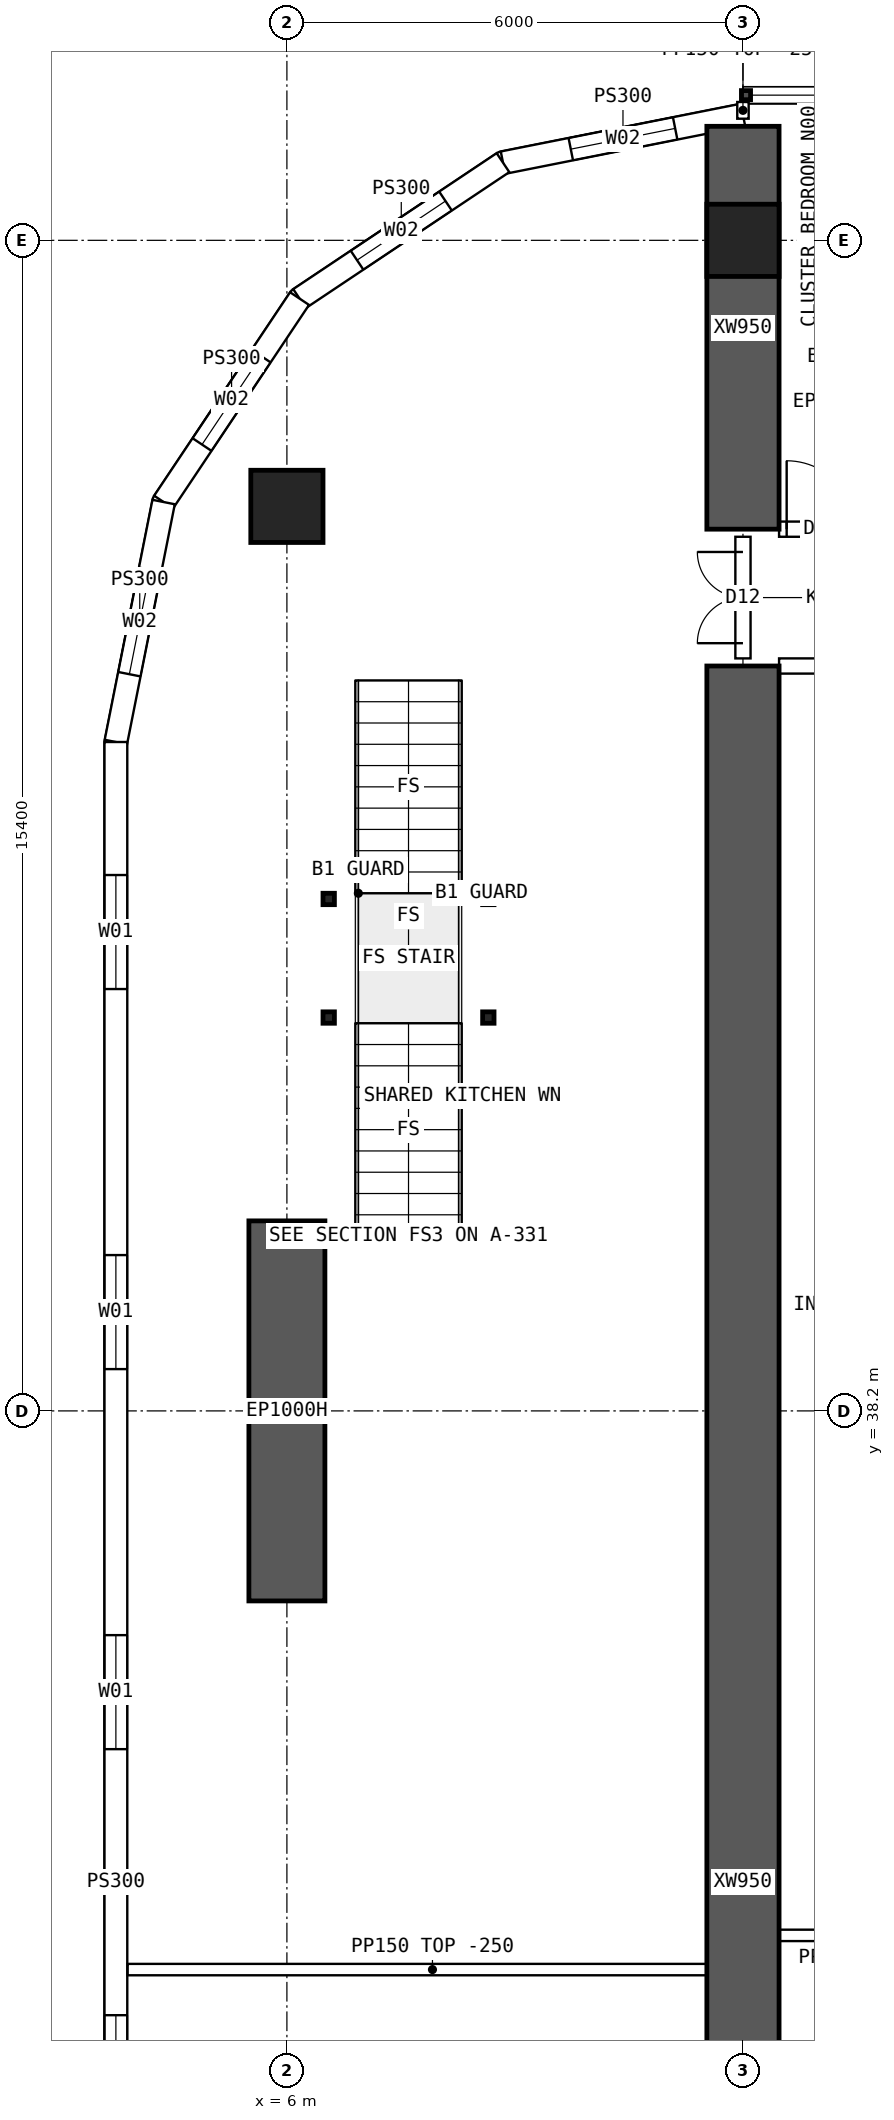
"""IFC4 building model, lengths in metres.
Left out: names, types, materials, properties, quantities, classifications, styles, units other than length and angle.
Written with IfcOpenShell. Run it as: python <this file> out.ifc"""

import sys

from ifc_helpers import new_model, si_unit, direction, frame, frame_2d, origin, origin_2d, place, context, subcontext, project, spatial, polyline, rectangle, hollow_rectangle, outline, extrude, element, fill, save


model = new_model("IFC4")
c1 = context("Model", 3, precision=1e-05, world=origin(), true_north=direction((0.0, 1.0)))
c2 = subcontext(c1, "Body", "Model", "MODEL_VIEW")
j1 = project(units=[si_unit("LENGTHUNIT", "METRE"), si_unit("PLANEANGLEUNIT", "RADIAN")], contexts=[c1])
p1 = place(None, origin())
s1 = spatial("IfcSite", under=j1, at=p1, CompositionType="ELEMENT")
p2 = place(p1, origin())
s2 = spatial("IfcBuilding", under=s1, at=p2, CompositionType="ELEMENT")
p3 = place(p2, frame((0.0, 0.0, 114.4)))
s3 = spatial("IfcBuildingStorey", under=s2, at=p3, CompositionType="ELEMENT", Elevation=114.4)
for number, where, z_axis, x_axis in (
    (1, (12.0, 53.6, 0.0), (0.0, 0.0, 1.0), (1.0, 0.0, 0.0)),
    (2, (6.0, 50.1, 0.0), (0.0, 0.0, 1.0), (1.0, 0.0, 0.0)),
):
    element("IfcColumn", number, at=place(p3, frame(where, z_axis=z_axis, x_axis=x_axis)), inside=s3, PredefinedType="COLUMN", context=c2, shape_type="SweptSolid", body=[
        extrude(hollow_rectangle(XDim=0.95, YDim=0.95, WallThickness=0.095, at=origin_2d()), origin(), (0.0, 0.0, 1.0), 3.75),
    ])
p4 = place(p3, frame((6.0, 35.7, 0.0), z_axis=(0.0, 0.0, 1.0), x_axis=(0.0, 1.0, 0.0)))
e3 = element("IfcWall", 3, at=p4, inside=s3, PredefinedType="SHEAR", context=c2, shape_type="SweptSolid", body=[
    extrude(rectangle(XDim=5.0, YDim=1.0, at=frame_2d((2.5, 0.0))), origin(), (0.0, 0.0, 1.0), 3.75),
])
p5 = place(p3, frame((12.0, 49.8, 0.0), z_axis=(0.0, 0.0, 1.0), x_axis=(0.0, 1.0, 0.0)))
e4 = element("IfcWall", 4, at=p5, inside=s3, PredefinedType="SHEAR", context=c2, shape_type="SweptSolid", body=[
    extrude(rectangle(XDim=5.3, YDim=0.95, at=frame_2d((2.65, 0.0))), origin(), (0.0, 0.0, 1.0), 3.75),
])
p6 = place(p3, frame((12.0, 16.0, 0.0), z_axis=(0.0, 0.0, 1.0), x_axis=(0.0, 1.0, 0.0)))
e5 = element("IfcWall", 5, at=p6, inside=s3, PredefinedType="SHEAR", context=c2, shape_type="SweptSolid", body=[
    extrude(rectangle(XDim=32.0, YDim=0.95, at=frame_2d((16.0, 0.0))), origin(), (0.0, 0.0, 1.0), 3.75),
])
p7 = place(p3, frame((3.75, 47.0, 0.0), z_axis=(0.0, 0.0, 1.0), x_axis=(0.0, -1.0, 0.0)))
e6 = element("IfcWall", 6, at=p7, inside=s3, PredefinedType="SOLIDWALL", context=c2, shape_type="SweptSolid", body=[
    extrude(outline(polyline([(-0.015, -0.15), (30.015, -0.15), (29.985, 0.15), (0.015, 0.15), (-0.015, -0.15)])), origin(), (0.0, 0.0, 1.0), 3.5),
])
p8 = place(p7, frame((1.75, 0.0, 0.9)))
e7 = element("IfcOpeningElement", 7, at=p8, cuts=e6, PredefinedType="OPENING", context=c2, shape_type="SweptSolid", body=[
    extrude(rectangle(XDim=1.5, YDim=2.0, at=frame_2d((0.75, 1.0))), frame((0.0, 0.16, 0.0), z_axis=(0.0, -1.0, 0.0), x_axis=(1.0, 0.0, 0.0)), (0.0, 0.0, 1.0), 0.32),
])
p9 = place(p7, frame((6.75, 0.0, 0.9)))
e8 = element("IfcOpeningElement", 8, at=p9, cuts=e6, PredefinedType="OPENING", context=c2, shape_type="SweptSolid", body=[
    extrude(rectangle(XDim=1.5, YDim=2.0, at=frame_2d((0.75, 1.0))), frame((0.0, 0.16, 0.0), z_axis=(0.0, -1.0, 0.0), x_axis=(1.0, 0.0, 0.0)), (0.0, 0.0, 1.0), 0.32),
])
p10 = place(p7, frame((11.75, 0.0, 0.9)))
e9 = element("IfcOpeningElement", 9, at=p10, cuts=e6, PredefinedType="OPENING", context=c2, shape_type="SweptSolid", body=[
    extrude(rectangle(XDim=1.5, YDim=2.0, at=frame_2d((0.75, 1.0))), frame((0.0, 0.16, 0.0), z_axis=(0.0, -1.0, 0.0), x_axis=(1.0, 0.0, 0.0)), (0.0, 0.0, 1.0), 0.32),
])
p11 = place(p7, frame((16.75, 0.0, 0.9)))
e10 = element("IfcOpeningElement", 10, at=p11, cuts=e6, PredefinedType="OPENING", context=c2, shape_type="SweptSolid", body=[
    extrude(rectangle(XDim=1.5, YDim=2.0, at=frame_2d((0.75, 1.0))), frame((0.0, 0.16, 0.0), z_axis=(0.0, -1.0, 0.0), x_axis=(1.0, 0.0, 0.0)), (0.0, 0.0, 1.0), 0.32),
])
p12 = place(p7, frame((21.75, 0.0, 0.9)))
e11 = element("IfcOpeningElement", 11, at=p12, cuts=e6, PredefinedType="OPENING", context=c2, shape_type="SweptSolid", body=[
    extrude(rectangle(XDim=1.5, YDim=2.0, at=frame_2d((0.75, 1.0))), frame((0.0, 0.16, 0.0), z_axis=(0.0, -1.0, 0.0), x_axis=(1.0, 0.0, 0.0)), (0.0, 0.0, 1.0), 0.32),
])
p13 = place(p7, frame((26.75, 0.0, 0.9)))
e12 = element("IfcOpeningElement", 12, at=p13, cuts=e6, PredefinedType="OPENING", context=c2, shape_type="SweptSolid", body=[
    extrude(rectangle(XDim=1.5, YDim=2.0, at=frame_2d((0.75, 1.0))), frame((0.0, 0.16, 0.0), z_axis=(0.0, -1.0, 0.0), x_axis=(1.0, 0.0, 0.0)), (0.0, 0.0, 1.0), 0.32),
])
p14 = place(p3, frame((12.0, 55.25, 0.0), z_axis=(0.0, 0.0, 1.0), x_axis=(-0.980787251524, -0.195080412259, 0.0)))
e13 = element("IfcWall", 13, at=p14, inside=s3, PredefinedType="SOLIDWALL", context=c2, shape_type="SweptSolid", body=[
    extrude(outline(polyline([(-0.03, -0.15), (3.249, -0.15), (3.189, 0.15), (0.03, 0.15), (-0.03, -0.15)])), origin(), (0.0, 0.0, 1.0), 3.5),
])
p15 = place(p14, frame((0.909, 0.0, 0.9)))
e14 = element("IfcOpeningElement", 14, at=p15, cuts=e13, PredefinedType="OPENING", context=c2, shape_type="SweptSolid", body=[
    extrude(rectangle(XDim=1.4, YDim=1.8, at=frame_2d((0.7, 0.9))), frame((0.0, 0.16, 0.0), z_axis=(0.0, -1.0, 0.0), x_axis=(1.0, 0.0, 0.0)), (0.0, 0.0, 1.0), 0.32),
])
p16 = place(p3, frame((8.843, 54.622, 0.0), z_axis=(0.0, 0.0, 1.0), x_axis=(-0.831443069936, -0.555609954424, 0.0)))
e15 = element("IfcWall", 15, at=p16, inside=s3, PredefinedType="SOLIDWALL", context=c2, shape_type="SweptSolid", body=[
    extrude(outline(polyline([(-0.03, -0.15), (3.249, -0.15), (3.189, 0.15), (0.03, 0.15), (-0.03, -0.15)])), origin(), (0.0, 0.0, 1.0), 3.5),
])
p17 = place(p16, frame((0.909, 0.0, 0.9)))
e16 = element("IfcOpeningElement", 16, at=p17, cuts=e15, PredefinedType="OPENING", context=c2, shape_type="SweptSolid", body=[
    extrude(rectangle(XDim=1.4, YDim=1.8, at=frame_2d((0.7, 0.9))), frame((0.0, 0.16, 0.0), z_axis=(0.0, -1.0, 0.0), x_axis=(1.0, 0.0, 0.0)), (0.0, 0.0, 1.0), 0.32),
])
p18 = place(p3, frame((6.167, 52.833, 0.0), z_axis=(0.0, 0.0, 1.0), x_axis=(-0.555609954424, -0.831443069936, 0.0)))
e17 = element("IfcWall", 17, at=p18, inside=s3, PredefinedType="SOLIDWALL", context=c2, shape_type="SweptSolid", body=[
    extrude(outline(polyline([(-0.03, -0.15), (3.249, -0.15), (3.189, 0.15), (0.03, 0.15), (-0.03, -0.15)])), origin(), (0.0, 0.0, 1.0), 3.5),
])
p19 = place(p18, frame((0.909, 0.0, 0.9)))
e18 = element("IfcOpeningElement", 18, at=p19, cuts=e17, PredefinedType="OPENING", context=c2, shape_type="SweptSolid", body=[
    extrude(rectangle(XDim=1.4, YDim=1.8, at=frame_2d((0.7, 0.9))), frame((0.0, 0.16, 0.0), z_axis=(0.0, -1.0, 0.0), x_axis=(1.0, 0.0, 0.0)), (0.0, 0.0, 1.0), 0.32),
])
p20 = place(p3, frame((4.378, 50.157, 0.0), z_axis=(0.0, 0.0, 1.0), x_axis=(-0.195080412259, -0.980787251524, 0.0)))
e19 = element("IfcWall", 19, at=p20, inside=s3, PredefinedType="SOLIDWALL", context=c2, shape_type="SweptSolid", body=[
    extrude(outline(polyline([(-0.03, -0.15), (3.234, -0.15), (3.204, 0.15), (0.03, 0.15), (-0.03, -0.15)])), origin(), (0.0, 0.0, 1.0), 3.5),
])
p21 = place(p20, frame((0.909, 0.0, 0.9)))
e20 = element("IfcOpeningElement", 20, at=p21, cuts=e19, PredefinedType="OPENING", context=c2, shape_type="SweptSolid", body=[
    extrude(rectangle(XDim=1.4, YDim=1.8, at=frame_2d((0.7, 0.9))), frame((0.0, 0.16, 0.0), z_axis=(0.0, -1.0, 0.0), x_axis=(1.0, 0.0, 0.0)), (0.0, 0.0, 1.0), 0.32),
])
p22 = place(p3, frame((12.475, 49.8, 0.0), z_axis=(0.0, 0.0, 1.0), x_axis=(1.0, 0.0, 0.0)))
e21 = element("IfcWall", 21, at=p22, inside=s3, PredefinedType="SOLIDWALL", context=c2, shape_type="SweptSolid", body=[
    extrude(outline(polyline([(0.0, 0.0), (5.05, 0.0), (5.05, 3.1), (0.0, 3.1), (0.0, 0.0)])), frame((0.0, 0.1, 0.0), z_axis=(0.0, -1.0, 0.0), x_axis=(1.0, 0.0, 0.0)), (0.0, 0.0, 1.0), 0.2),
])
p23 = place(p22, frame((0.1, 0.0, 0.0)))
e22 = element("IfcOpeningElement", 22, at=p23, cuts=e21, PredefinedType="OPENING", context=c2, shape_type="SweptSolid", body=[
    extrude(rectangle(XDim=0.9, YDim=2.1, at=frame_2d((0.45, 1.05))), frame((0.0, 0.11, 0.0), z_axis=(0.0, -1.0, 0.0), x_axis=(1.0, 0.0, 0.0)), (0.0, 0.0, 1.0), 0.22),
])
p24 = place(p22, frame((3.9, 0.0, 0.0)))
e23 = element("IfcOpeningElement", 23, at=p24, cuts=e21, PredefinedType="OPENING", context=c2, shape_type="SweptSolid", body=[
    extrude(rectangle(XDim=0.9, YDim=2.1, at=frame_2d((0.45, 1.05))), frame((0.0, 0.11, 0.0), z_axis=(0.0, -1.0, 0.0), x_axis=(1.0, 0.0, 0.0)), (0.0, 0.0, 1.0), 0.22),
])
p25 = place(p3, frame((12.475, 48.0, 0.0), z_axis=(0.0, 0.0, 1.0), x_axis=(1.0, 0.0, 0.0)))
e24 = element("IfcWall", 24, at=p25, inside=s3, PredefinedType="SOLIDWALL", context=c2, shape_type="SweptSolid", body=[
    extrude(rectangle(XDim=5.05, YDim=0.2, at=frame_2d((2.525, 0.0))), origin(), (0.0, 0.0, 1.0), 3.5),
])
p26 = place(p25, frame((3.325, 0.0, 0.0)))
e25 = element("IfcOpeningElement", 25, at=p26, cuts=e24, PredefinedType="OPENING", context=c2, shape_type="SweptSolid", body=[
    extrude(rectangle(XDim=1.6, YDim=2.1, at=frame_2d((0.8, 1.05))), frame((0.0, 0.11, 0.0), z_axis=(0.0, -1.0, 0.0), x_axis=(1.0, 0.0, 0.0)), (0.0, 0.0, 1.0), 0.22),
])
p27 = place(p3, frame((12.0, 31.3, 0.0), z_axis=(0.0, 0.0, 1.0), x_axis=(1.0, 0.0, 0.0)))
e26 = element("IfcWall", 26, at=p27, inside=s3, PredefinedType="PARTITIONING", context=c2, shape_type="SweptSolid", body=[
    extrude(rectangle(XDim=3.6, YDim=0.15, at=frame_2d((1.8, 0.0))), origin(), (0.0, 0.0, 1.0), 3.5),
])
p28 = place(p3, frame((3.905, 30.85, 0.0), z_axis=(0.0, 0.0, 1.0), x_axis=(1.0, 0.0, 0.0)))
e27 = element("IfcWall", 27, at=p28, inside=s3, PredefinedType="PARTITIONING", context=c2, shape_type="SweptSolid", body=[
    extrude(outline(polyline([(0.0, 0.0), (8.02, 0.0), (8.02, 3.5), (2.397, 3.5), (2.395, 3.05), (1.797, 3.05), (1.795, 3.5), (0.0, 3.5), (0.0, 0.0)])), frame((0.0, 0.075, 0.0), z_axis=(0.0, -1.0, 0.0), x_axis=(1.0, 0.0, 0.0)), (0.0, 0.0, 1.0), 0.15),
])
p29 = place(p3, frame((12.0, 48.1, 0.0), z_axis=(0.0, 0.0, 1.0), x_axis=(0.0, 1.0, 0.0)))
e28 = element("IfcWall", 28, at=p29, inside=s3, PredefinedType="SOLIDWALL", context=c2, shape_type="SweptSolid", body=[
    extrude(outline(polyline([(0.0, 0.0), (1.6, 0.0), (1.6, 3.1), (0.0, 3.1), (0.0, 0.0)])), frame((0.0, 0.1, 0.0), z_axis=(0.0, -1.0, 0.0), x_axis=(1.0, 0.0, 0.0)), (0.0, 0.0, 1.0), 0.2),
])
p30 = place(p29, frame((0.2, 0.0, 0.0)))
e29 = element("IfcOpeningElement", 29, at=p30, cuts=e28, PredefinedType="OPENING", context=c2, shape_type="SweptSolid", body=[
    extrude(rectangle(XDim=1.2, YDim=2.1, at=frame_2d((0.6, 1.05))), frame((0.0, 0.11, 0.0), z_axis=(0.0, -1.0, 0.0), x_axis=(1.0, 0.0, 0.0)), (0.0, 0.0, 1.0), 0.22),
])
p31 = place(p3, frame((12.0, 55.2, 0.0), z_axis=(0.0, 0.0, 1.0), x_axis=(0.0, 1.0, 0.0)))
e30 = element("IfcWall", 30, at=p31, inside=s3, PredefinedType="PARTITIONING", context=c2, shape_type="SweptSolid", body=[
    extrude(rectangle(XDim=0.22, YDim=0.15, at=frame_2d((0.11, 0.0))), origin(), (0.0, 0.0, 1.0), 3.5),
])
for number, where, z_axis, x_axis in (
    (31, (6.55, 43.375, 0.0), (0.0, 0.0, 1.0), (1.0, 0.0, 0.0)),
    (32, (8.65, 43.375, 0.0), (0.0, 0.0, 1.0), (1.0, 0.0, 0.0)),
    (33, (6.55, 44.935, 0.0), (0.0, 0.0, 1.0), (1.0, 0.0, 0.0)),
    (34, (8.65, 44.935, 0.0), (0.0, 0.0, 1.0), (1.0, 0.0, 0.0)),
):
    element("IfcColumn", number, at=place(p3, frame(where, z_axis=z_axis, x_axis=x_axis)), inside=s3, PredefinedType="COLUMN", context=c2, shape_type="SweptSolid", body=[
        extrude(hollow_rectangle(XDim=0.15, YDim=0.15, WallThickness=0.008, at=origin_2d()), origin(), (0.0, 0.0, 1.0), 3.5),
    ])
p32 = place(p8, origin())
e35 = element("IfcWindow", 35, at=p32, inside=s3, PartitioningType="SINGLE_PANEL", PredefinedType="WINDOW", context=c2, shape_type="SweptSolid", body=[
    extrude(rectangle(XDim=1.5, YDim=2.0, at=frame_2d((0.75, 1.0))), frame((0.0, 0.03, 0.0), z_axis=(0.0, -1.0, 0.0), x_axis=(1.0, 0.0, 0.0)), (0.0, 0.0, 1.0), 0.06),
])
fill(e7, e35)
p33 = place(p9, origin())
e36 = element("IfcWindow", 36, at=p33, inside=s3, PartitioningType="SINGLE_PANEL", PredefinedType="WINDOW", context=c2, shape_type="SweptSolid", body=[
    extrude(rectangle(XDim=1.5, YDim=2.0, at=frame_2d((0.75, 1.0))), frame((0.0, 0.03, 0.0), z_axis=(0.0, -1.0, 0.0), x_axis=(1.0, 0.0, 0.0)), (0.0, 0.0, 1.0), 0.06),
])
fill(e8, e36)
p34 = place(p10, origin())
e37 = element("IfcWindow", 37, at=p34, inside=s3, PartitioningType="SINGLE_PANEL", PredefinedType="WINDOW", context=c2, shape_type="SweptSolid", body=[
    extrude(rectangle(XDim=1.5, YDim=2.0, at=frame_2d((0.75, 1.0))), frame((0.0, 0.03, 0.0), z_axis=(0.0, -1.0, 0.0), x_axis=(1.0, 0.0, 0.0)), (0.0, 0.0, 1.0), 0.06),
])
fill(e9, e37)
p35 = place(p11, origin())
e38 = element("IfcWindow", 38, at=p35, inside=s3, PartitioningType="SINGLE_PANEL", PredefinedType="WINDOW", context=c2, shape_type="SweptSolid", body=[
    extrude(rectangle(XDim=1.5, YDim=2.0, at=frame_2d((0.75, 1.0))), frame((0.0, 0.03, 0.0), z_axis=(0.0, -1.0, 0.0), x_axis=(1.0, 0.0, 0.0)), (0.0, 0.0, 1.0), 0.06),
])
fill(e10, e38)
p36 = place(p15, origin())
e39 = element("IfcWindow", 39, at=p36, inside=s3, PartitioningType="SINGLE_PANEL", PredefinedType="WINDOW", context=c2, shape_type="SweptSolid", body=[
    extrude(rectangle(XDim=1.4, YDim=1.8, at=frame_2d((0.7, 0.9))), frame((0.0, 0.03, 0.0), z_axis=(0.0, -1.0, 0.0), x_axis=(1.0, 0.0, 0.0)), (0.0, 0.0, 1.0), 0.06),
])
fill(e14, e39)
p37 = place(p17, origin())
e40 = element("IfcWindow", 40, at=p37, inside=s3, PartitioningType="SINGLE_PANEL", PredefinedType="WINDOW", context=c2, shape_type="SweptSolid", body=[
    extrude(rectangle(XDim=1.4, YDim=1.8, at=frame_2d((0.7, 0.9))), frame((0.0, 0.03, 0.0), z_axis=(0.0, -1.0, 0.0), x_axis=(1.0, 0.0, 0.0)), (0.0, 0.0, 1.0), 0.06),
])
fill(e16, e40)
p38 = place(p19, origin())
e41 = element("IfcWindow", 41, at=p38, inside=s3, PartitioningType="SINGLE_PANEL", PredefinedType="WINDOW", context=c2, shape_type="SweptSolid", body=[
    extrude(rectangle(XDim=1.4, YDim=1.8, at=frame_2d((0.7, 0.9))), frame((0.0, 0.03, 0.0), z_axis=(0.0, -1.0, 0.0), x_axis=(1.0, 0.0, 0.0)), (0.0, 0.0, 1.0), 0.06),
])
fill(e18, e41)
p39 = place(p21, origin())
e42 = element("IfcWindow", 42, at=p39, inside=s3, PartitioningType="SINGLE_PANEL", PredefinedType="WINDOW", context=c2, shape_type="SweptSolid", body=[
    extrude(rectangle(XDim=1.4, YDim=1.8, at=frame_2d((0.7, 0.9))), frame((0.0, 0.03, 0.0), z_axis=(0.0, -1.0, 0.0), x_axis=(1.0, 0.0, 0.0)), (0.0, 0.0, 1.0), 0.06),
])
fill(e20, e42)
p40 = place(p23, origin())
e43 = element("IfcDoor", 43, at=p40, inside=s3, OperationType="SINGLE_SWING_LEFT", PredefinedType="DOOR", context=c2, shape_type="SweptSolid", body=[
    extrude(rectangle(XDim=0.9, YDim=2.1, at=frame_2d((0.45, 1.05))), frame((0.0, 0.025, 0.0), z_axis=(0.0, -1.0, 0.0), x_axis=(1.0, 0.0, 0.0)), (0.0, 0.0, 1.0), 0.05),
])
fill(e22, e43)
p41 = place(p30, origin())
e44 = element("IfcDoor", 44, at=p41, inside=s3, OperationType="DOUBLE_DOOR_SINGLE_SWING", PredefinedType="DOOR", context=c2, shape_type="SweptSolid", body=[
    extrude(rectangle(XDim=1.2, YDim=2.1, at=frame_2d((0.6, 1.05))), frame((0.0, 0.025, 0.0), z_axis=(0.0, -1.0, 0.0), x_axis=(1.0, 0.0, 0.0)), (0.0, 0.0, 1.0), 0.05),
])
fill(e29, e44)
save(model, sys.argv[1])
